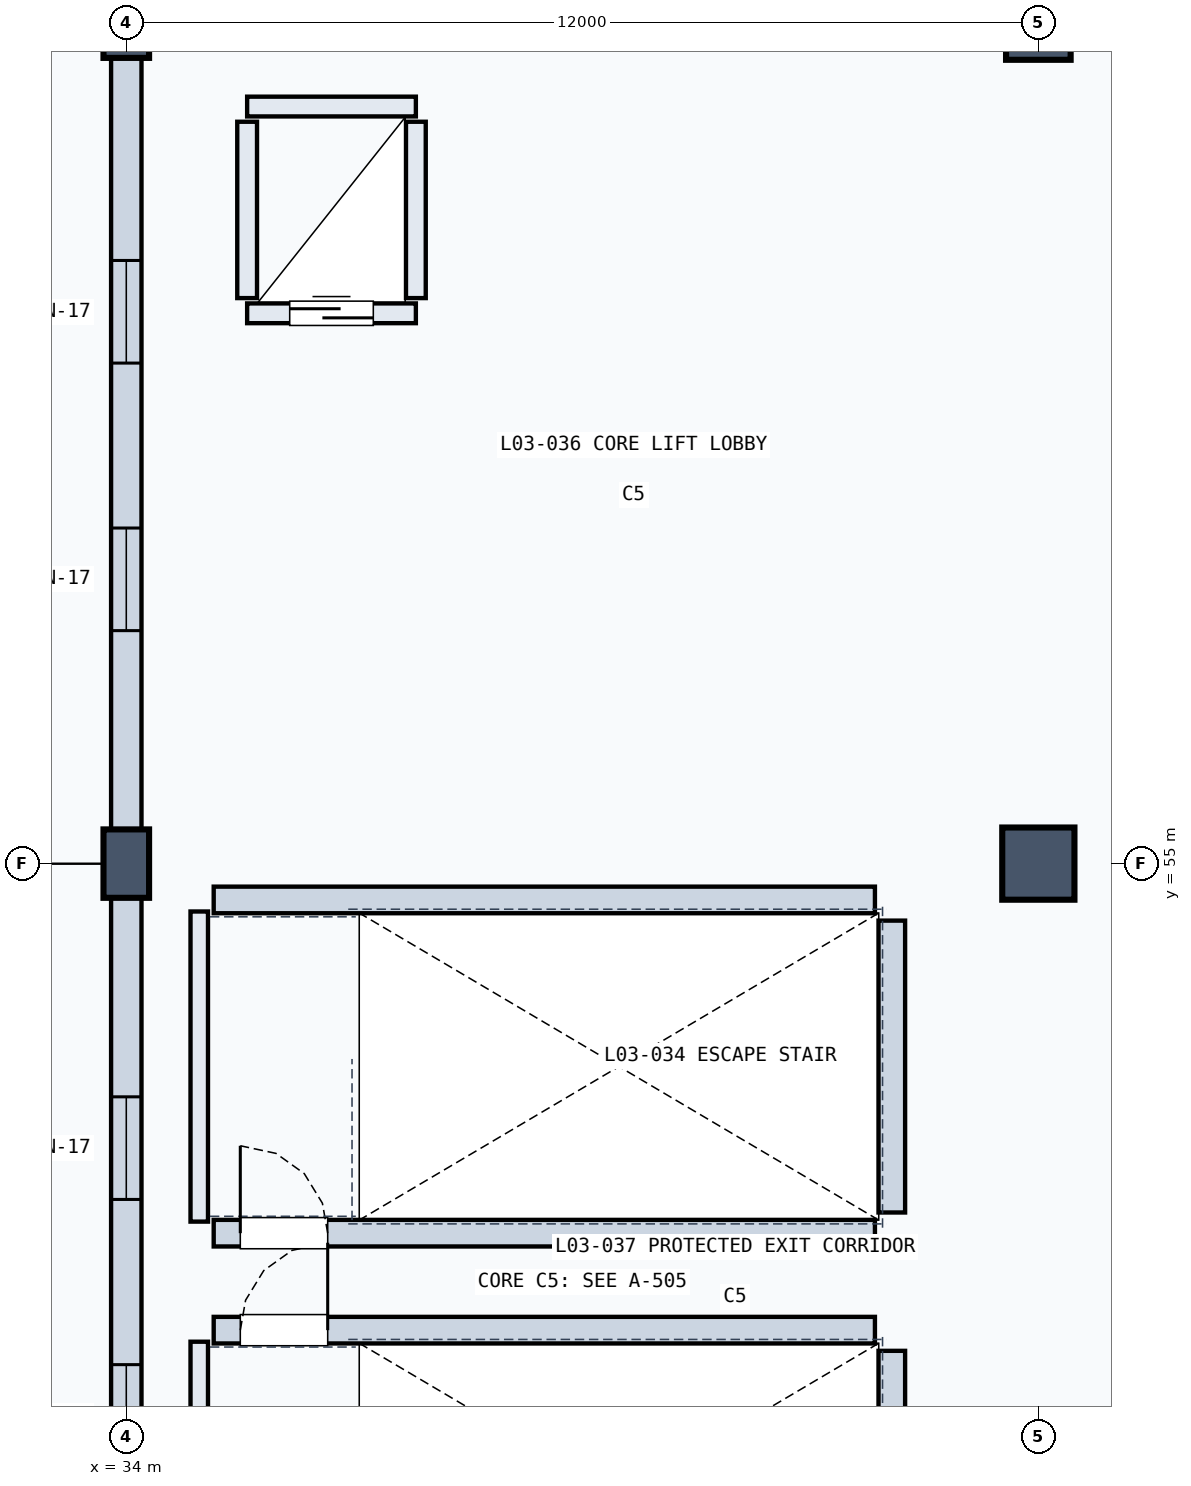
"""IFC4 building model, lengths in metres.
Left out: names, types, materials, properties, quantities, classifications, styles, units other than length and angle.
Written with IfcOpenShell. Run it as: python <this file> out.ifc"""

import sys

from ifc_helpers import new_model, si_unit, direction, frame, frame_2d, origin, origin_2d, place, context, subcontext, project, spatial, rectangle, extrude, element, fill, save


model = new_model("IFC4")
c1 = context("Model", 3, precision=1e-05, world=origin(), true_north=direction((0.0, 1.0)))
c2 = subcontext(c1, "Body", "Model", "MODEL_VIEW")
j1 = project(units=[si_unit("LENGTHUNIT", "METRE"), si_unit("PLANEANGLEUNIT", "RADIAN")], contexts=[c1])
p1 = place(None, origin())
s1 = spatial("IfcSite", under=j1, at=p1, CompositionType="ELEMENT")
p2 = place(p1, origin())
s2 = spatial("IfcBuilding", under=s1, at=p2, CompositionType="ELEMENT")
p3 = place(p2, frame((0.0, 0.0, 14.7)))
s3 = spatial("IfcBuildingStorey", under=s2, at=p3, CompositionType="ELEMENT", Elevation=14.7)
p4 = place(p3, frame((34.0, 55.0, 0.0), z_axis=(0.0, 0.0, 1.0), x_axis=(1.0, 0.0, 0.0)))
e1 = element("IfcColumn", 1, at=p4, inside=s3, PredefinedType="COLUMN", context=c2, shape_type="SweptSolid", body=[
    extrude(rectangle(XDim=0.6, YDim=0.9, at=origin_2d()), origin(), (0.0, 0.0, 1.0), 4.8),
])
p5 = place(p3, frame((34.0, 66.0, 0.0), z_axis=(0.0, 0.0, 1.0), x_axis=(1.0, 0.0, 0.0)))
e2 = element("IfcColumn", 2, at=p5, inside=s3, PredefinedType="COLUMN", context=c2, shape_type="SweptSolid", body=[
    extrude(rectangle(XDim=0.6, YDim=0.8, at=origin_2d()), origin(), (0.0, 0.0, 1.0), 4.8),
])
p6 = place(p3, frame((46.0, 55.0, 0.0), z_axis=(0.0, 0.0, 1.0), x_axis=(1.0, 0.0, 0.0)))
e3 = element("IfcColumn", 3, at=p6, inside=s3, PredefinedType="COLUMN", context=c2, shape_type="SweptSolid", body=[
    extrude(rectangle(XDim=0.95, YDim=0.95, at=origin_2d()), origin(), (0.0, 0.0, 1.0), 4.8),
])
p7 = place(p3, frame((46.0, 66.0, 0.0), z_axis=(0.0, 0.0, 1.0), x_axis=(1.0, 0.0, 0.0)))
e4 = element("IfcColumn", 4, at=p7, inside=s3, PredefinedType="COLUMN", context=c2, shape_type="SweptSolid", body=[
    extrude(rectangle(XDim=0.85, YDim=0.85, at=origin_2d()), origin(), (0.0, 0.0, 1.0), 4.8),
])
p8 = place(p3, frame((34.0, 44.21, 0.0), z_axis=(0.0, 0.0, 1.0), x_axis=(0.0, 1.0, 0.0)))
e5 = element("IfcWall", 5, at=p8, inside=s3, PredefinedType="SOLIDWALL", context=c2, shape_type="SweptSolid", body=[
    extrude(rectangle(XDim=10.57, YDim=0.4, at=frame_2d((5.285, 0.0))), origin(), (0.0, 0.0, 1.0), 4.465),
])
p9 = place(p8, frame((2.848, 0.0, 0.8)))
e6 = element("IfcOpeningElement", 6, at=p9, cuts=e5, PredefinedType="OPENING", context=c2, shape_type="SweptSolid", body=[
    extrude(rectangle(XDim=1.35, YDim=2.1, at=frame_2d((0.675, 1.05))), frame((0.0, 0.21, 0.0), z_axis=(0.0, -1.0, 0.0), x_axis=(1.0, 0.0, 0.0)), (0.0, 0.0, 1.0), 0.42),
])
p10 = place(p8, frame((6.372, 0.0, 0.8)))
e7 = element("IfcOpeningElement", 7, at=p10, cuts=e5, PredefinedType="OPENING", context=c2, shape_type="SweptSolid", body=[
    extrude(rectangle(XDim=1.35, YDim=2.1, at=frame_2d((0.675, 1.05))), frame((0.0, 0.21, 0.0), z_axis=(0.0, -1.0, 0.0), x_axis=(1.0, 0.0, 0.0)), (0.0, 0.0, 1.0), 0.42),
])
p11 = place(p3, frame((34.0, 55.22, 0.0), z_axis=(0.0, 0.0, 1.0), x_axis=(0.0, 1.0, 0.0)))
e8 = element("IfcWall", 8, at=p11, inside=s3, PredefinedType="SOLIDWALL", context=c2, shape_type="SweptSolid", body=[
    extrude(rectangle(XDim=10.56, YDim=0.4, at=frame_2d((5.28, 0.0))), origin(), (0.0, 0.0, 1.0), 4.465),
])
p12 = place(p11, frame((2.845, 0.0, 0.8)))
e9 = element("IfcOpeningElement", 9, at=p12, cuts=e8, PredefinedType="OPENING", context=c2, shape_type="SweptSolid", body=[
    extrude(rectangle(XDim=1.35, YDim=2.1, at=frame_2d((0.675, 1.05))), frame((0.0, 0.21, 0.0), z_axis=(0.0, -1.0, 0.0), x_axis=(1.0, 0.0, 0.0)), (0.0, 0.0, 1.0), 0.42),
])
p13 = place(p11, frame((6.365, 0.0, 0.8)))
e10 = element("IfcOpeningElement", 10, at=p13, cuts=e8, PredefinedType="OPENING", context=c2, shape_type="SweptSolid", body=[
    extrude(rectangle(XDim=1.35, YDim=2.1, at=frame_2d((0.675, 1.05))), frame((0.0, 0.21, 0.0), z_axis=(0.0, -1.0, 0.0), x_axis=(1.0, 0.0, 0.0)), (0.0, 0.0, 1.0), 0.42),
])
p14 = place(p3, frame((34.96, 44.63, 0.0), z_axis=(0.0, 0.0, 1.0), x_axis=(0.0, 1.0, 0.0)))
e11 = element("IfcWall", 11, at=p14, inside=s3, PredefinedType="SOLIDWALL", context=c2, shape_type="SweptSolid", body=[
    extrude(rectangle(XDim=4.08, YDim=0.23, at=frame_2d((2.04, 0.0))), origin(), (0.0, 0.0, 1.0), 4.46),
])
p15 = place(p3, frame((44.072, 44.05, 0.0), z_axis=(0.0, 0.0, 1.0), x_axis=(0.0, 1.0, 0.0)))
e12 = element("IfcWall", 12, at=p15, inside=s3, PredefinedType="SOLIDWALL", context=c2, shape_type="SweptSolid", body=[
    extrude(rectangle(XDim=4.54, YDim=0.35, at=frame_2d((2.27, 0.0))), origin(), (0.0, 0.0, 1.0), 4.46),
])
p16 = place(p3, frame((35.15, 48.862, 0.0), z_axis=(0.0, 0.0, 1.0), x_axis=(1.0, 0.0, 0.0)))
e13 = element("IfcWall", 13, at=p16, inside=s3, PredefinedType="SOLIDWALL", context=c2, shape_type="SweptSolid", body=[
    extrude(rectangle(XDim=8.7, YDim=0.35, at=frame_2d((4.35, 0.0))), origin(), (0.0, 0.0, 1.0), 4.46),
])
p17 = place(p16, frame((0.35, 0.0, 0.0)))
e14 = element("IfcOpeningElement", 14, at=p17, cuts=e13, PredefinedType="OPENING", context=c2, shape_type="SweptSolid", body=[
    extrude(rectangle(XDim=1.15, YDim=2.2, at=frame_2d((0.575, 1.1))), frame((0.0, 0.185, 0.0), z_axis=(0.0, -1.0, 0.0), x_axis=(1.0, 0.0, 0.0)), (0.0, 0.0, 1.0), 0.37),
])
p18 = place(p3, frame((34.96, 50.29, 0.0), z_axis=(0.0, 0.0, 1.0), x_axis=(0.0, 1.0, 0.0)))
e15 = element("IfcWall", 15, at=p18, inside=s3, PredefinedType="SOLIDWALL", context=c2, shape_type="SweptSolid", body=[
    extrude(rectangle(XDim=4.08, YDim=0.23, at=frame_2d((2.04, 0.0))), origin(), (0.0, 0.0, 1.0), 4.46),
])
p19 = place(p3, frame((44.072, 50.41, 0.0), z_axis=(0.0, 0.0, 1.0), x_axis=(0.0, 1.0, 0.0)))
e16 = element("IfcWall", 16, at=p19, inside=s3, PredefinedType="SOLIDWALL", context=c2, shape_type="SweptSolid", body=[
    extrude(rectangle(XDim=3.84, YDim=0.35, at=frame_2d((1.92, 0.0))), origin(), (0.0, 0.0, 1.0), 4.46),
])
p20 = place(p3, frame((35.15, 50.138, 0.0), z_axis=(0.0, 0.0, 1.0), x_axis=(1.0, 0.0, 0.0)))
e17 = element("IfcWall", 17, at=p20, inside=s3, PredefinedType="SOLIDWALL", context=c2, shape_type="SweptSolid", body=[
    extrude(rectangle(XDim=8.7, YDim=0.35, at=frame_2d((4.35, 0.0))), origin(), (0.0, 0.0, 1.0), 4.46),
])
p21 = place(p20, frame((0.35, 0.0, 0.0)))
e18 = element("IfcOpeningElement", 18, at=p21, cuts=e17, PredefinedType="OPENING", context=c2, shape_type="SweptSolid", body=[
    extrude(rectangle(XDim=1.15, YDim=2.2, at=frame_2d((0.575, 1.1))), frame((0.0, 0.185, 0.0), z_axis=(0.0, -1.0, 0.0), x_axis=(1.0, 0.0, 0.0)), (0.0, 0.0, 1.0), 0.37),
])
p22 = place(p3, frame((35.15, 54.522, 0.0), z_axis=(0.0, 0.0, 1.0), x_axis=(1.0, 0.0, 0.0)))
e19 = element("IfcWall", 19, at=p22, inside=s3, PredefinedType="SOLIDWALL", context=c2, shape_type="SweptSolid", body=[
    extrude(rectangle(XDim=8.7, YDim=0.35, at=frame_2d((4.35, 0.0))), origin(), (0.0, 0.0, 1.0), 4.46),
])
p23 = place(p3, frame((35.59, 62.24, 0.0), z_axis=(0.0, 0.0, 1.0), x_axis=(1.0, 0.0, 0.0)))
e20 = element("IfcWall", 20, at=p23, inside=s3, PredefinedType="SOLIDWALL", context=c2, shape_type="SweptSolid", body=[
    extrude(rectangle(XDim=2.22, YDim=0.26, at=frame_2d((1.11, 0.0))), origin(), (0.0, 0.0, 1.0), 4.46),
])
p24 = place(p23, frame((0.56, 0.0, 0.0)))
e21 = element("IfcOpeningElement", 21, at=p24, cuts=e20, PredefinedType="OPENING", context=c2, shape_type="SweptSolid", body=[
    extrude(rectangle(XDim=1.1, YDim=2.15, at=frame_2d((0.55, 1.075))), frame((0.0, 0.14, 0.0), z_axis=(0.0, -1.0, 0.0), x_axis=(1.0, 0.0, 0.0)), (0.0, 0.0, 1.0), 0.28),
])
p25 = place(p3, frame((35.59, 64.96, 0.0), z_axis=(0.0, 0.0, 1.0), x_axis=(1.0, 0.0, 0.0)))
e22 = element("IfcWall", 22, at=p25, inside=s3, PredefinedType="SOLIDWALL", context=c2, shape_type="SweptSolid", body=[
    extrude(rectangle(XDim=2.22, YDim=0.26, at=frame_2d((1.11, 0.0))), origin(), (0.0, 0.0, 1.0), 4.46),
])
for number, where, z_axis, x_axis in (
    (23, (35.59, 62.44, 0.0), (0.0, 0.0, 1.0), (0.0, 1.0, 0.0)),
    (24, (37.81, 62.44, 0.0), (0.0, 0.0, 1.0), (0.0, 1.0, 0.0)),
):
    element("IfcWall", number, at=place(p3, frame(where, z_axis=z_axis, x_axis=x_axis)), inside=s3, PredefinedType="SOLIDWALL", context=c2, shape_type="SweptSolid", body=[
        extrude(rectangle(XDim=2.32, YDim=0.26, at=frame_2d((1.16, 0.0))), origin(), (0.0, 0.0, 1.0), 4.46),
    ])
p26 = place(p9, origin())
e25 = element("IfcWindow", 25, at=p26, inside=s3, PartitioningType="SINGLE_PANEL", PredefinedType="WINDOW", context=c2, shape_type="SweptSolid", body=[
    extrude(rectangle(XDim=1.35, YDim=2.1, at=frame_2d((0.675, 1.05))), frame((0.0, 0.03, 0.0), z_axis=(0.0, -1.0, 0.0), x_axis=(1.0, 0.0, 0.0)), (0.0, 0.0, 1.0), 0.06),
])
fill(e6, e25)
p27 = place(p10, origin())
e26 = element("IfcWindow", 26, at=p27, inside=s3, PartitioningType="SINGLE_PANEL", PredefinedType="WINDOW", context=c2, shape_type="SweptSolid", body=[
    extrude(rectangle(XDim=1.35, YDim=2.1, at=frame_2d((0.675, 1.05))), frame((0.0, 0.03, 0.0), z_axis=(0.0, -1.0, 0.0), x_axis=(1.0, 0.0, 0.0)), (0.0, 0.0, 1.0), 0.06),
])
fill(e7, e26)
p28 = place(p12, origin())
e27 = element("IfcWindow", 27, at=p28, inside=s3, PartitioningType="SINGLE_PANEL", PredefinedType="WINDOW", context=c2, shape_type="SweptSolid", body=[
    extrude(rectangle(XDim=1.35, YDim=2.1, at=frame_2d((0.675, 1.05))), frame((0.0, 0.03, 0.0), z_axis=(0.0, -1.0, 0.0), x_axis=(1.0, 0.0, 0.0)), (0.0, 0.0, 1.0), 0.06),
])
fill(e9, e27)
p29 = place(p13, origin())
e28 = element("IfcWindow", 28, at=p29, inside=s3, PartitioningType="SINGLE_PANEL", PredefinedType="WINDOW", context=c2, shape_type="SweptSolid", body=[
    extrude(rectangle(XDim=1.35, YDim=2.1, at=frame_2d((0.675, 1.05))), frame((0.0, 0.03, 0.0), z_axis=(0.0, -1.0, 0.0), x_axis=(1.0, 0.0, 0.0)), (0.0, 0.0, 1.0), 0.06),
])
fill(e10, e28)
p30 = place(p17, origin())
e29 = element("IfcDoor", 29, at=p30, inside=s3, OperationType="SINGLE_SWING_RIGHT", PredefinedType="DOOR", context=c2, shape_type="SweptSolid", body=[
    extrude(rectangle(XDim=1.15, YDim=2.2, at=frame_2d((0.575, 1.1))), frame((0.0, 0.025, 0.0), z_axis=(0.0, -1.0, 0.0), x_axis=(1.0, 0.0, 0.0)), (0.0, 0.0, 1.0), 0.05),
])
fill(e14, e29)
p31 = place(p21, origin())
e30 = element("IfcDoor", 30, at=p31, inside=s3, OperationType="SINGLE_SWING_LEFT", PredefinedType="DOOR", context=c2, shape_type="SweptSolid", body=[
    extrude(rectangle(XDim=1.15, YDim=2.2, at=frame_2d((0.575, 1.1))), frame((0.0, 0.025, 0.0), z_axis=(0.0, -1.0, 0.0), x_axis=(1.0, 0.0, 0.0)), (0.0, 0.0, 1.0), 0.05),
])
fill(e18, e30)
p32 = place(p24, origin())
e31 = element("IfcDoor", 31, at=p32, inside=s3, OperationType="SLIDING_TO_LEFT", PredefinedType="DOOR", context=c2, shape_type="SweptSolid", body=[
    extrude(rectangle(XDim=1.1, YDim=2.15, at=frame_2d((0.55, 1.075))), frame((0.0, 0.025, 0.0), z_axis=(0.0, -1.0, 0.0), x_axis=(1.0, 0.0, 0.0)), (0.0, 0.0, 1.0), 0.05),
])
fill(e21, e31)
save(model, sys.argv[1])
